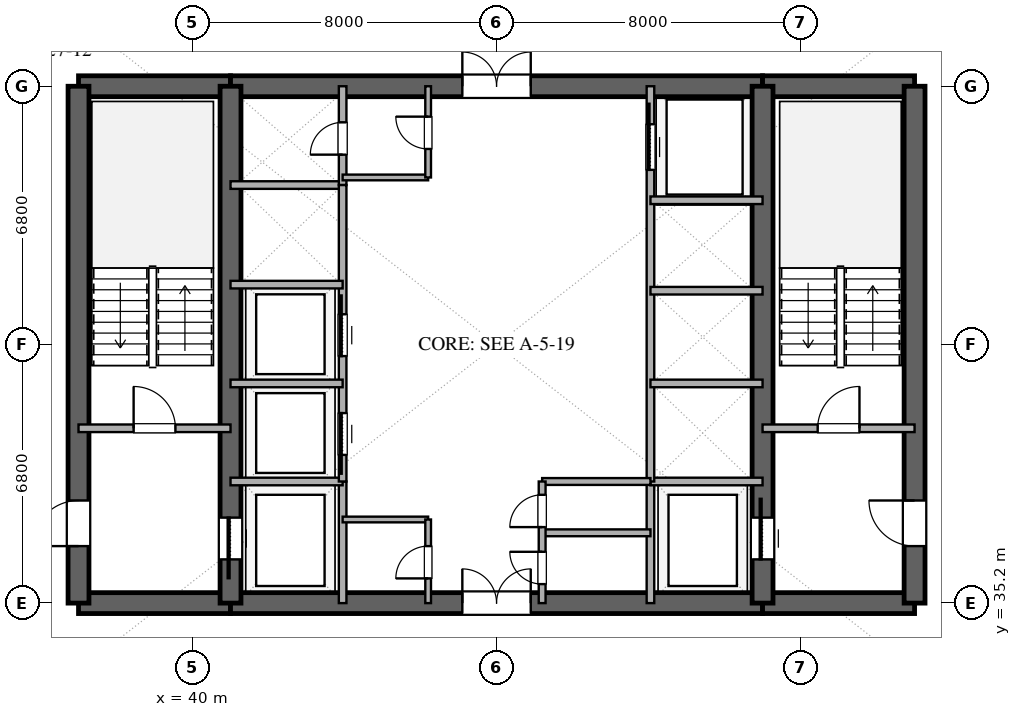
"""IFC4 building model, lengths in metres.
Left out: names, types, materials, properties, quantities, classifications, styles, units other than length and angle.
Written with IfcOpenShell. Run it as: python <this file> out.ifc"""

import sys

from ifc_helpers import new_model, si_unit, direction, frame, frame_2d, origin, place, context, subcontext, project, spatial, rectangle, extrude, element, fill, save


model = new_model("IFC4")
c1 = context("Model", 3, precision=1e-05, world=origin(), true_north=direction((0.0, 1.0)))
c2 = subcontext(c1, "Body", "Model", "MODEL_VIEW")
j1 = project(units=[si_unit("LENGTHUNIT", "METRE"), si_unit("PLANEANGLEUNIT", "RADIAN")], contexts=[c1])
p1 = place(None, origin())
s1 = spatial("IfcSite", under=j1, at=p1, CompositionType="ELEMENT")
p2 = place(p1, origin())
s2 = spatial("IfcBuilding", under=s1, at=p2, CompositionType="ELEMENT")
p3 = place(p2, frame((0.0, 0.0, 109.2)))
s3 = spatial("IfcBuildingStorey", under=s2, at=p3, CompositionType="ELEMENT", Elevation=109.2)
p4 = place(p3, frame((37.0, 35.2, 0.0), z_axis=(0.0, 0.0, 1.0), x_axis=(1.0, 0.0, 0.0)))
e1 = element("IfcWall", 1, at=p4, inside=s3, PredefinedType="SHEAR", context=c2, shape_type="SweptSolid", body=[
    extrude(rectangle(XDim=4.0, YDim=0.55, at=frame_2d((2.0, 0.0))), origin(), (0.0, 0.0, 1.0), 3.38),
])
p5 = place(p3, frame((41.0, 35.2, 0.0), z_axis=(0.0, 0.0, 1.0), x_axis=(1.0, 0.0, 0.0)))
e2 = element("IfcWall", 2, at=p5, inside=s3, PredefinedType="SHEAR", context=c2, shape_type="SweptSolid", body=[
    extrude(rectangle(XDim=14.0, YDim=0.55, at=frame_2d((7.0, 0.0))), origin(), (0.0, 0.0, 1.0), 3.38),
])
p6 = place(p5, frame((6.1, 0.0, 0.0)))
e3 = element("IfcOpeningElement", 3, at=p6, cuts=e2, PredefinedType="OPENING", context=c2, shape_type="SweptSolid", body=[
    extrude(rectangle(XDim=1.8, YDim=2.25, at=frame_2d((0.9, 1.125))), frame((0.0, 0.285, 0.0), z_axis=(0.0, -1.0, 0.0), x_axis=(1.0, 0.0, 0.0)), (0.0, 0.0, 1.0), 0.57),
])
for number, where, z_axis, x_axis in (
    (4, (55.0, 35.2, 0.0), (0.0, 0.0, 1.0), (1.0, 0.0, 0.0)),
    (5, (37.0, 48.8, 0.0), (0.0, 0.0, 1.0), (1.0, 0.0, 0.0)),
):
    element("IfcWall", number, at=place(p3, frame(where, z_axis=z_axis, x_axis=x_axis)), inside=s3, PredefinedType="SHEAR", context=c2, shape_type="SweptSolid", body=[
        extrude(rectangle(XDim=4.0, YDim=0.55, at=frame_2d((2.0, 0.0))), origin(), (0.0, 0.0, 1.0), 3.38),
    ])
p7 = place(p3, frame((41.0, 48.8, 0.0), z_axis=(0.0, 0.0, 1.0), x_axis=(1.0, 0.0, 0.0)))
e6 = element("IfcWall", 6, at=p7, inside=s3, PredefinedType="SHEAR", context=c2, shape_type="SweptSolid", body=[
    extrude(rectangle(XDim=14.0, YDim=0.55, at=frame_2d((7.0, 0.0))), origin(), (0.0, 0.0, 1.0), 3.38),
])
p8 = place(p7, frame((6.1, 0.0, 0.0)))
e7 = element("IfcOpeningElement", 7, at=p8, cuts=e6, PredefinedType="OPENING", context=c2, shape_type="SweptSolid", body=[
    extrude(rectangle(XDim=1.8, YDim=2.25, at=frame_2d((0.9, 1.125))), frame((0.0, 0.285, 0.0), z_axis=(0.0, -1.0, 0.0), x_axis=(1.0, 0.0, 0.0)), (0.0, 0.0, 1.0), 0.57),
])
p9 = place(p3, frame((55.0, 48.8, 0.0), z_axis=(0.0, 0.0, 1.0), x_axis=(1.0, 0.0, 0.0)))
e8 = element("IfcWall", 8, at=p9, inside=s3, PredefinedType="SHEAR", context=c2, shape_type="SweptSolid", body=[
    extrude(rectangle(XDim=4.0, YDim=0.55, at=frame_2d((2.0, 0.0))), origin(), (0.0, 0.0, 1.0), 3.38),
])
p10 = place(p3, frame((37.0, 35.2, 0.0), z_axis=(0.0, 0.0, 1.0), x_axis=(0.0, 1.0, 0.0)))
e9 = element("IfcWall", 9, at=p10, inside=s3, PredefinedType="SHEAR", context=c2, shape_type="SweptSolid", body=[
    extrude(rectangle(XDim=13.6, YDim=0.55, at=frame_2d((6.8, 0.0))), origin(), (0.0, 0.0, 1.0), 3.38),
])
p11 = place(p10, frame((1.5, 0.0, 0.0)))
e10 = element("IfcOpeningElement", 10, at=p11, cuts=e9, PredefinedType="OPENING", context=c2, shape_type="SweptSolid", body=[
    extrude(rectangle(XDim=1.2, YDim=2.15, at=frame_2d((0.6, 1.075))), frame((0.0, 0.285, 0.0), z_axis=(0.0, -1.0, 0.0), x_axis=(1.0, 0.0, 0.0)), (0.0, 0.0, 1.0), 0.57),
])
p12 = place(p3, frame((59.0, 35.2, 0.0), z_axis=(0.0, 0.0, 1.0), x_axis=(0.0, 1.0, 0.0)))
e11 = element("IfcWall", 11, at=p12, inside=s3, PredefinedType="SHEAR", context=c2, shape_type="SweptSolid", body=[
    extrude(rectangle(XDim=13.6, YDim=0.55, at=frame_2d((6.8, 0.0))), origin(), (0.0, 0.0, 1.0), 3.38),
])
p13 = place(p12, frame((1.5, 0.0, 0.0)))
e12 = element("IfcOpeningElement", 12, at=p13, cuts=e11, PredefinedType="OPENING", context=c2, shape_type="SweptSolid", body=[
    extrude(rectangle(XDim=1.2, YDim=2.15, at=frame_2d((0.6, 1.075))), frame((0.0, 0.285, 0.0), z_axis=(0.0, -1.0, 0.0), x_axis=(1.0, 0.0, 0.0)), (0.0, 0.0, 1.0), 0.57),
])
p14 = place(p3, frame((41.0, 35.2, 0.0), z_axis=(0.0, 0.0, 1.0), x_axis=(0.0, 1.0, 0.0)))
e13 = element("IfcWall", 13, at=p14, inside=s3, PredefinedType="SHEAR", context=c2, shape_type="SweptSolid", body=[
    extrude(rectangle(XDim=13.6, YDim=0.55, at=frame_2d((6.8, 0.0))), origin(), (0.0, 0.0, 1.0), 3.38),
])
p15 = place(p14, frame((1.15, 0.0, 0.0)))
e14 = element("IfcOpeningElement", 14, at=p15, cuts=e13, PredefinedType="OPENING", context=c2, shape_type="SweptSolid", body=[
    extrude(rectangle(XDim=1.1, YDim=2.2, at=frame_2d((0.55, 1.1))), frame((0.0, 0.285, 0.0), z_axis=(0.0, -1.0, 0.0), x_axis=(1.0, 0.0, 0.0)), (0.0, 0.0, 1.0), 0.57),
])
p16 = place(p3, frame((55.0, 35.2, 0.0), z_axis=(0.0, 0.0, 1.0), x_axis=(0.0, 1.0, 0.0)))
e15 = element("IfcWall", 15, at=p16, inside=s3, PredefinedType="SHEAR", context=c2, shape_type="SweptSolid", body=[
    extrude(rectangle(XDim=13.6, YDim=0.55, at=frame_2d((6.8, 0.0))), origin(), (0.0, 0.0, 1.0), 3.38),
])
p17 = place(p16, frame((1.15, 0.0, 0.0)))
e16 = element("IfcOpeningElement", 16, at=p17, cuts=e15, PredefinedType="OPENING", context=c2, shape_type="SweptSolid", body=[
    extrude(rectangle(XDim=1.1, YDim=2.2, at=frame_2d((0.55, 1.1))), frame((0.0, 0.285, 0.0), z_axis=(0.0, -1.0, 0.0), x_axis=(1.0, 0.0, 0.0)), (0.0, 0.0, 1.0), 0.57),
])
p18 = place(p3, frame((37.0, 39.8, 0.0), z_axis=(0.0, 0.0, 1.0), x_axis=(1.0, 0.0, 0.0)))
e17 = element("IfcWall", 17, at=p18, inside=s3, PredefinedType="SOLIDWALL", context=c2, shape_type="SweptSolid", body=[
    extrude(rectangle(XDim=4.0, YDim=0.2, at=frame_2d((2.0, 0.0))), origin(), (0.0, 0.0, 1.0), 2.74),
])
p19 = place(p18, frame((1.45, 0.0, 0.0)))
e18 = element("IfcOpeningElement", 18, at=p19, cuts=e17, PredefinedType="OPENING", context=c2, shape_type="SweptSolid", body=[
    extrude(rectangle(XDim=1.1, YDim=2.15, at=frame_2d((0.55, 1.075))), frame((0.0, 0.11, 0.0), z_axis=(0.0, -1.0, 0.0), x_axis=(1.0, 0.0, 0.0)), (0.0, 0.0, 1.0), 0.22),
])
p20 = place(p3, frame((55.0, 39.8, 0.0), z_axis=(0.0, 0.0, 1.0), x_axis=(1.0, 0.0, 0.0)))
e19 = element("IfcWall", 19, at=p20, inside=s3, PredefinedType="SOLIDWALL", context=c2, shape_type="SweptSolid", body=[
    extrude(rectangle(XDim=4.0, YDim=0.2, at=frame_2d((2.0, 0.0))), origin(), (0.0, 0.0, 1.0), 2.74),
])
p21 = place(p20, frame((1.45, 0.0, 0.0)))
e20 = element("IfcOpeningElement", 20, at=p21, cuts=e19, PredefinedType="OPENING", context=c2, shape_type="SweptSolid", body=[
    extrude(rectangle(XDim=1.1, YDim=2.15, at=frame_2d((0.55, 1.075))), frame((0.0, 0.11, 0.0), z_axis=(0.0, -1.0, 0.0), x_axis=(1.0, 0.0, 0.0)), (0.0, 0.0, 1.0), 0.22),
])
p22 = place(p3, frame((43.95, 35.2, 0.0), z_axis=(0.0, 0.0, 1.0), x_axis=(0.0, 1.0, 0.0)))
e21 = element("IfcWall", 21, at=p22, inside=s3, PredefinedType="SOLIDWALL", context=c2, shape_type="SweptSolid", body=[
    extrude(rectangle(XDim=3.2, YDim=0.2, at=frame_2d((1.6, 0.0))), origin(), (0.0, 0.0, 1.0), 2.74),
])
p23 = place(p3, frame((41.0, 38.4, 0.0), z_axis=(0.0, 0.0, 1.0), x_axis=(1.0, 0.0, 0.0)))
e22 = element("IfcWall", 22, at=p23, inside=s3, PredefinedType="SOLIDWALL", context=c2, shape_type="SweptSolid", body=[
    extrude(rectangle(XDim=2.95, YDim=0.2, at=frame_2d((1.475, 0.0))), origin(), (0.0, 0.0, 1.0), 2.74),
])
p24 = place(p3, frame((52.05, 35.2, 0.0), z_axis=(0.0, 0.0, 1.0), x_axis=(0.0, 1.0, 0.0)))
e23 = element("IfcWall", 23, at=p24, inside=s3, PredefinedType="SOLIDWALL", context=c2, shape_type="SweptSolid", body=[
    extrude(rectangle(XDim=3.2, YDim=0.2, at=frame_2d((1.6, 0.0))), origin(), (0.0, 0.0, 1.0), 2.74),
])
for number, where, z_axis, x_axis in (
    (24, (52.05, 38.4, 0.0), (0.0, 0.0, 1.0), (1.0, 0.0, 0.0)),
    (25, (41.0, 46.2, 0.0), (0.0, 0.0, 1.0), (1.0, 0.0, 0.0)),
):
    element("IfcWall", number, at=place(p3, frame(where, z_axis=z_axis, x_axis=x_axis)), inside=s3, PredefinedType="SOLIDWALL", context=c2, shape_type="SweptSolid", body=[
        extrude(rectangle(XDim=2.95, YDim=0.2, at=frame_2d((1.475, 0.0))), origin(), (0.0, 0.0, 1.0), 2.74),
    ])
p25 = place(p3, frame((43.95, 46.2, 0.0), z_axis=(0.0, 0.0, 1.0), x_axis=(0.0, 1.0, 0.0)))
e26 = element("IfcWall", 26, at=p25, inside=s3, PredefinedType="SOLIDWALL", context=c2, shape_type="SweptSolid", body=[
    extrude(rectangle(XDim=2.6, YDim=0.2, at=frame_2d((1.3, 0.0))), origin(), (0.0, 0.0, 1.0), 2.74),
])
p26 = place(p25, frame((0.8, 0.0, 0.0)))
e27 = element("IfcOpeningElement", 27, at=p26, cuts=e26, PredefinedType="OPENING", context=c2, shape_type="SweptSolid", body=[
    extrude(rectangle(XDim=0.85, YDim=2.15, at=frame_2d((0.425, 1.075))), frame((0.0, 0.11, 0.0), z_axis=(0.0, -1.0, 0.0), x_axis=(1.0, 0.0, 0.0)), (0.0, 0.0, 1.0), 0.22),
])
p27 = place(p3, frame((43.95, 38.4, 0.0), z_axis=(0.0, 0.0, 1.0), x_axis=(0.0, 1.0, 0.0)))
e28 = element("IfcWall", 28, at=p27, inside=s3, PredefinedType="SOLIDWALL", context=c2, shape_type="SweptSolid", body=[
    extrude(rectangle(XDim=7.8, YDim=0.2, at=frame_2d((3.9, 0.0))), origin(), (0.0, 0.0, 1.0), 2.74),
])
p28 = place(p27, frame((0.7, 0.0, 0.0)))
e29 = element("IfcOpeningElement", 29, at=p28, cuts=e28, PredefinedType="OPENING", context=c2, shape_type="SweptSolid", body=[
    extrude(rectangle(XDim=1.1, YDim=2.2, at=frame_2d((0.55, 1.1))), frame((0.0, 0.11, 0.0), z_axis=(0.0, -1.0, 0.0), x_axis=(1.0, 0.0, 0.0)), (0.0, 0.0, 1.0), 0.22),
])
p29 = place(p27, frame((3.3, 0.0, 0.0)))
e30 = element("IfcOpeningElement", 30, at=p29, cuts=e28, PredefinedType="OPENING", context=c2, shape_type="SweptSolid", body=[
    extrude(rectangle(XDim=1.1, YDim=2.2, at=frame_2d((0.55, 1.1))), frame((0.0, 0.11, 0.0), z_axis=(0.0, -1.0, 0.0), x_axis=(1.0, 0.0, 0.0)), (0.0, 0.0, 1.0), 0.22),
])
for number, where, z_axis, x_axis in (
    (31, (41.0, 40.98, 0.0), (0.0, 0.0, 1.0), (1.0, 0.0, 0.0)),
    (32, (41.0, 43.58, 0.0), (0.0, 0.0, 1.0), (1.0, 0.0, 0.0)),
):
    element("IfcWall", number, at=place(p3, frame(where, z_axis=z_axis, x_axis=x_axis)), inside=s3, PredefinedType="SOLIDWALL", context=c2, shape_type="SweptSolid", body=[
        extrude(rectangle(XDim=2.95, YDim=0.2, at=frame_2d((1.475, 0.0))), origin(), (0.0, 0.0, 1.0), 2.74),
    ])
p30 = place(p3, frame((52.05, 38.4, 0.0), z_axis=(0.0, 0.0, 1.0), x_axis=(0.0, 1.0, 0.0)))
e33 = element("IfcWall", 33, at=p30, inside=s3, PredefinedType="SOLIDWALL", context=c2, shape_type="SweptSolid", body=[
    extrude(rectangle(XDim=10.4, YDim=0.2, at=frame_2d((5.2, 0.0))), origin(), (0.0, 0.0, 1.0), 2.74),
])
p31 = place(p30, frame((8.2, 0.0, 0.0)))
e34 = element("IfcOpeningElement", 34, at=p31, cuts=e33, PredefinedType="OPENING", context=c2, shape_type="SweptSolid", body=[
    extrude(rectangle(XDim=1.2, YDim=2.2, at=frame_2d((0.6, 1.1))), frame((0.0, 0.11, 0.0), z_axis=(0.0, -1.0, 0.0), x_axis=(1.0, 0.0, 0.0)), (0.0, 0.0, 1.0), 0.22),
])
for number, where, z_axis, x_axis in (
    (35, (52.05, 40.98, 0.0), (0.0, 0.0, 1.0), (1.0, 0.0, 0.0)),
    (36, (52.05, 43.42, 0.0), (0.0, 0.0, 1.0), (1.0, 0.0, 0.0)),
    (37, (52.05, 45.8, 0.0), (0.0, 0.0, 1.0), (1.0, 0.0, 0.0)),
):
    element("IfcWall", number, at=place(p3, frame(where, z_axis=z_axis, x_axis=x_axis)), inside=s3, PredefinedType="SOLIDWALL", context=c2, shape_type="SweptSolid", body=[
        extrude(rectangle(XDim=2.95, YDim=0.2, at=frame_2d((1.475, 0.0))), origin(), (0.0, 0.0, 1.0), 2.74),
    ])
p32 = place(p3, frame((43.95, 37.4, 0.0), z_axis=(0.0, 0.0, 1.0), x_axis=(1.0, 0.0, 0.0)))
e38 = element("IfcWall", 38, at=p32, inside=s3, PredefinedType="PARTITIONING", context=c2, shape_type="SweptSolid", body=[
    extrude(rectangle(XDim=2.25, YDim=0.15, at=frame_2d((1.125, 0.0))), origin(), (0.0, 0.0, 1.0), 2.74),
])
p33 = place(p3, frame((46.2, 35.2, 0.0), z_axis=(0.0, 0.0, 1.0), x_axis=(0.0, 1.0, 0.0)))
e39 = element("IfcWall", 39, at=p33, inside=s3, PredefinedType="PARTITIONING", context=c2, shape_type="SweptSolid", body=[
    extrude(rectangle(XDim=2.2, YDim=0.15, at=frame_2d((1.1, 0.0))), origin(), (0.0, 0.0, 1.0), 2.74),
])
p34 = place(p33, frame((0.65, 0.0, 0.0)))
e40 = element("IfcOpeningElement", 40, at=p34, cuts=e39, PredefinedType="OPENING", context=c2, shape_type="SweptSolid", body=[
    extrude(rectangle(XDim=0.85, YDim=2.15, at=frame_2d((0.425, 1.075))), frame((0.0, 0.085, 0.0), z_axis=(0.0, -1.0, 0.0), x_axis=(1.0, 0.0, 0.0)), (0.0, 0.0, 1.0), 0.17),
])
p35 = place(p3, frame((43.95, 46.4, 0.0), z_axis=(0.0, 0.0, 1.0), x_axis=(1.0, 0.0, 0.0)))
e41 = element("IfcWall", 41, at=p35, inside=s3, PredefinedType="PARTITIONING", context=c2, shape_type="SweptSolid", body=[
    extrude(rectangle(XDim=2.25, YDim=0.15, at=frame_2d((1.125, 0.0))), origin(), (0.0, 0.0, 1.0), 2.74),
])
p36 = place(p3, frame((46.2, 46.4, 0.0), z_axis=(0.0, 0.0, 1.0), x_axis=(0.0, 1.0, 0.0)))
e42 = element("IfcWall", 42, at=p36, inside=s3, PredefinedType="PARTITIONING", context=c2, shape_type="SweptSolid", body=[
    extrude(rectangle(XDim=2.4, YDim=0.15, at=frame_2d((1.2, 0.0))), origin(), (0.0, 0.0, 1.0), 2.74),
])
p37 = place(p36, frame((0.75, 0.0, 0.0)))
e43 = element("IfcOpeningElement", 43, at=p37, cuts=e42, PredefinedType="OPENING", context=c2, shape_type="SweptSolid", body=[
    extrude(rectangle(XDim=0.85, YDim=2.15, at=frame_2d((0.425, 1.075))), frame((0.0, 0.085, 0.0), z_axis=(0.0, -1.0, 0.0), x_axis=(1.0, 0.0, 0.0)), (0.0, 0.0, 1.0), 0.17),
])
for number, where, z_axis, x_axis in (
    (44, (49.2, 37.05, 0.0), (0.0, 0.0, 1.0), (1.0, 0.0, 0.0)),
    (45, (49.2, 38.4, 0.0), (0.0, 0.0, 1.0), (1.0, 0.0, 0.0)),
):
    element("IfcWall", number, at=place(p3, frame(where, z_axis=z_axis, x_axis=x_axis)), inside=s3, PredefinedType="PLUMBINGWALL", context=c2, shape_type="SweptSolid", body=[
        extrude(rectangle(XDim=2.85, YDim=0.18, at=frame_2d((1.425, 0.0))), origin(), (0.0, 0.0, 1.0), 2.74),
    ])
p38 = place(p3, frame((49.2, 35.2, 0.0), z_axis=(0.0, 0.0, 1.0), x_axis=(0.0, 1.0, 0.0)))
e46 = element("IfcWall", 46, at=p38, inside=s3, PredefinedType="PLUMBINGWALL", context=c2, shape_type="SweptSolid", body=[
    extrude(rectangle(XDim=3.2, YDim=0.18, at=frame_2d((1.6, 0.0))), origin(), (0.0, 0.0, 1.0), 2.74),
])
p39 = place(p38, frame((0.5, 0.0, 0.0)))
e47 = element("IfcOpeningElement", 47, at=p39, cuts=e46, PredefinedType="OPENING", context=c2, shape_type="SweptSolid", body=[
    extrude(rectangle(XDim=0.85, YDim=2.1, at=frame_2d((0.425, 1.05))), frame((0.0, 0.1, 0.0), z_axis=(0.0, -1.0, 0.0), x_axis=(1.0, 0.0, 0.0)), (0.0, 0.0, 1.0), 0.2),
])
p40 = place(p38, frame((2.0, 0.0, 0.0)))
e48 = element("IfcOpeningElement", 48, at=p40, cuts=e46, PredefinedType="OPENING", context=c2, shape_type="SweptSolid", body=[
    extrude(rectangle(XDim=0.85, YDim=2.15, at=frame_2d((0.425, 1.075))), frame((0.0, 0.1, 0.0), z_axis=(0.0, -1.0, 0.0), x_axis=(1.0, 0.0, 0.0)), (0.0, 0.0, 1.0), 0.2),
])
p41 = place(p15, origin())
e49 = element("IfcDoor", 49, at=p41, inside=s3, OperationType="SLIDING_TO_LEFT", PredefinedType="DOOR", context=c2, shape_type="SweptSolid", body=[
    extrude(rectangle(XDim=1.1, YDim=2.2, at=frame_2d((0.55, 1.1))), frame((0.0, 0.025, 0.0), z_axis=(0.0, -1.0, 0.0), x_axis=(1.0, 0.0, 0.0)), (0.0, 0.0, 1.0), 0.05),
])
fill(e14, e49)
p42 = place(p17, origin())
e50 = element("IfcDoor", 50, at=p42, inside=s3, OperationType="SLIDING_TO_RIGHT", PredefinedType="DOOR", context=c2, shape_type="SweptSolid", body=[
    extrude(rectangle(XDim=1.1, YDim=2.2, at=frame_2d((0.55, 1.1))), frame((0.0, 0.025, 0.0), z_axis=(0.0, -1.0, 0.0), x_axis=(1.0, 0.0, 0.0)), (0.0, 0.0, 1.0), 0.05),
])
fill(e16, e50)
p43 = place(p11, origin())
e51 = element("IfcDoor", 51, at=p43, inside=s3, OperationType="SINGLE_SWING_LEFT", PredefinedType="DOOR", context=c2, shape_type="SweptSolid", body=[
    extrude(rectangle(XDim=1.2, YDim=2.15, at=frame_2d((0.6, 1.075))), frame((0.0, 0.025, 0.0), z_axis=(0.0, -1.0, 0.0), x_axis=(1.0, 0.0, 0.0)), (0.0, 0.0, 1.0), 0.05),
])
fill(e10, e51)
p44 = place(p13, origin())
e52 = element("IfcDoor", 52, at=p44, inside=s3, OperationType="SINGLE_SWING_RIGHT", PredefinedType="DOOR", context=c2, shape_type="SweptSolid", body=[
    extrude(rectangle(XDim=1.2, YDim=2.15, at=frame_2d((0.6, 1.075))), frame((0.0, 0.025, 0.0), z_axis=(0.0, -1.0, 0.0), x_axis=(1.0, 0.0, 0.0)), (0.0, 0.0, 1.0), 0.05),
])
fill(e12, e52)
p45 = place(p6, origin())
e53 = element("IfcDoor", 53, at=p45, inside=s3, OperationType="DOUBLE_DOOR_SINGLE_SWING", PredefinedType="DOOR", context=c2, shape_type="SweptSolid", body=[
    extrude(rectangle(XDim=1.8, YDim=2.25, at=frame_2d((0.9, 1.125))), frame((0.0, 0.025, 0.0), z_axis=(0.0, -1.0, 0.0), x_axis=(1.0, 0.0, 0.0)), (0.0, 0.0, 1.0), 0.05),
])
fill(e3, e53)
p46 = place(p8, origin())
e54 = element("IfcDoor", 54, at=p46, inside=s3, OperationType="DOUBLE_DOOR_SINGLE_SWING", PredefinedType="DOOR", context=c2, shape_type="SweptSolid", body=[
    extrude(rectangle(XDim=1.8, YDim=2.25, at=frame_2d((0.9, 1.125))), frame((0.0, 0.025, 0.0), z_axis=(0.0, -1.0, 0.0), x_axis=(1.0, 0.0, 0.0)), (0.0, 0.0, 1.0), 0.05),
])
fill(e7, e54)
p47 = place(p19, origin())
e55 = element("IfcDoor", 55, at=p47, inside=s3, OperationType="SINGLE_SWING_LEFT", PredefinedType="DOOR", context=c2, shape_type="SweptSolid", body=[
    extrude(rectangle(XDim=1.1, YDim=2.15, at=frame_2d((0.55, 1.075))), frame((0.0, 0.025, 0.0), z_axis=(0.0, -1.0, 0.0), x_axis=(1.0, 0.0, 0.0)), (0.0, 0.0, 1.0), 0.05),
])
fill(e18, e55)
p48 = place(p21, origin())
e56 = element("IfcDoor", 56, at=p48, inside=s3, OperationType="SINGLE_SWING_RIGHT", PredefinedType="DOOR", context=c2, shape_type="SweptSolid", body=[
    extrude(rectangle(XDim=1.1, YDim=2.15, at=frame_2d((0.55, 1.075))), frame((0.0, 0.025, 0.0), z_axis=(0.0, -1.0, 0.0), x_axis=(1.0, 0.0, 0.0)), (0.0, 0.0, 1.0), 0.05),
])
fill(e20, e56)
p49 = place(p26, origin())
e57 = element("IfcDoor", 57, at=p49, inside=s3, OperationType="SINGLE_SWING_LEFT", PredefinedType="DOOR", context=c2, shape_type="SweptSolid", body=[
    extrude(rectangle(XDim=0.85, YDim=2.15, at=frame_2d((0.425, 1.075))), frame((0.0, 0.025, 0.0), z_axis=(0.0, -1.0, 0.0), x_axis=(1.0, 0.0, 0.0)), (0.0, 0.0, 1.0), 0.05),
])
fill(e27, e57)
p50 = place(p28, origin())
e58 = element("IfcDoor", 58, at=p50, inside=s3, OperationType="SLIDING_TO_LEFT", PredefinedType="DOOR", context=c2, shape_type="SweptSolid", body=[
    extrude(rectangle(XDim=1.1, YDim=2.2, at=frame_2d((0.55, 1.1))), frame((0.0, 0.025, 0.0), z_axis=(0.0, -1.0, 0.0), x_axis=(1.0, 0.0, 0.0)), (0.0, 0.0, 1.0), 0.05),
])
fill(e29, e58)
p51 = place(p29, origin())
e59 = element("IfcDoor", 59, at=p51, inside=s3, OperationType="SLIDING_TO_RIGHT", PredefinedType="DOOR", context=c2, shape_type="SweptSolid", body=[
    extrude(rectangle(XDim=1.1, YDim=2.2, at=frame_2d((0.55, 1.1))), frame((0.0, 0.025, 0.0), z_axis=(0.0, -1.0, 0.0), x_axis=(1.0, 0.0, 0.0)), (0.0, 0.0, 1.0), 0.05),
])
fill(e30, e59)
p52 = place(p31, origin())
e60 = element("IfcDoor", 60, at=p52, inside=s3, OperationType="SLIDING_TO_RIGHT", PredefinedType="DOOR", context=c2, shape_type="SweptSolid", body=[
    extrude(rectangle(XDim=1.2, YDim=2.2, at=frame_2d((0.6, 1.1))), frame((0.0, 0.025, 0.0), z_axis=(0.0, -1.0, 0.0), x_axis=(1.0, 0.0, 0.0)), (0.0, 0.0, 1.0), 0.05),
])
fill(e34, e60)
p53 = place(p34, origin())
e61 = element("IfcDoor", 61, at=p53, inside=s3, OperationType="SINGLE_SWING_LEFT", PredefinedType="DOOR", context=c2, shape_type="SweptSolid", body=[
    extrude(rectangle(XDim=0.85, YDim=2.15, at=frame_2d((0.425, 1.075))), frame((0.0, 0.025, 0.0), z_axis=(0.0, -1.0, 0.0), x_axis=(1.0, 0.0, 0.0)), (0.0, 0.0, 1.0), 0.05),
])
fill(e40, e61)
p54 = place(p37, origin())
e62 = element("IfcDoor", 62, at=p54, inside=s3, OperationType="SINGLE_SWING_RIGHT", PredefinedType="DOOR", context=c2, shape_type="SweptSolid", body=[
    extrude(rectangle(XDim=0.85, YDim=2.15, at=frame_2d((0.425, 1.075))), frame((0.0, 0.025, 0.0), z_axis=(0.0, -1.0, 0.0), x_axis=(1.0, 0.0, 0.0)), (0.0, 0.0, 1.0), 0.05),
])
fill(e43, e62)
p55 = place(p39, origin())
e63 = element("IfcDoor", 63, at=p55, inside=s3, OperationType="SINGLE_SWING_RIGHT", PredefinedType="DOOR", context=c2, shape_type="SweptSolid", body=[
    extrude(rectangle(XDim=0.85, YDim=2.1, at=frame_2d((0.425, 1.05))), frame((0.0, 0.025, 0.0), z_axis=(0.0, -1.0, 0.0), x_axis=(1.0, 0.0, 0.0)), (0.0, 0.0, 1.0), 0.05),
])
fill(e47, e63)
p56 = place(p40, origin())
e64 = element("IfcDoor", 64, at=p56, inside=s3, OperationType="SINGLE_SWING_LEFT", PredefinedType="DOOR", context=c2, shape_type="SweptSolid", body=[
    extrude(rectangle(XDim=0.85, YDim=2.15, at=frame_2d((0.425, 1.075))), frame((0.0, 0.025, 0.0), z_axis=(0.0, -1.0, 0.0), x_axis=(1.0, 0.0, 0.0)), (0.0, 0.0, 1.0), 0.05),
])
fill(e48, e64)
save(model, sys.argv[1])
